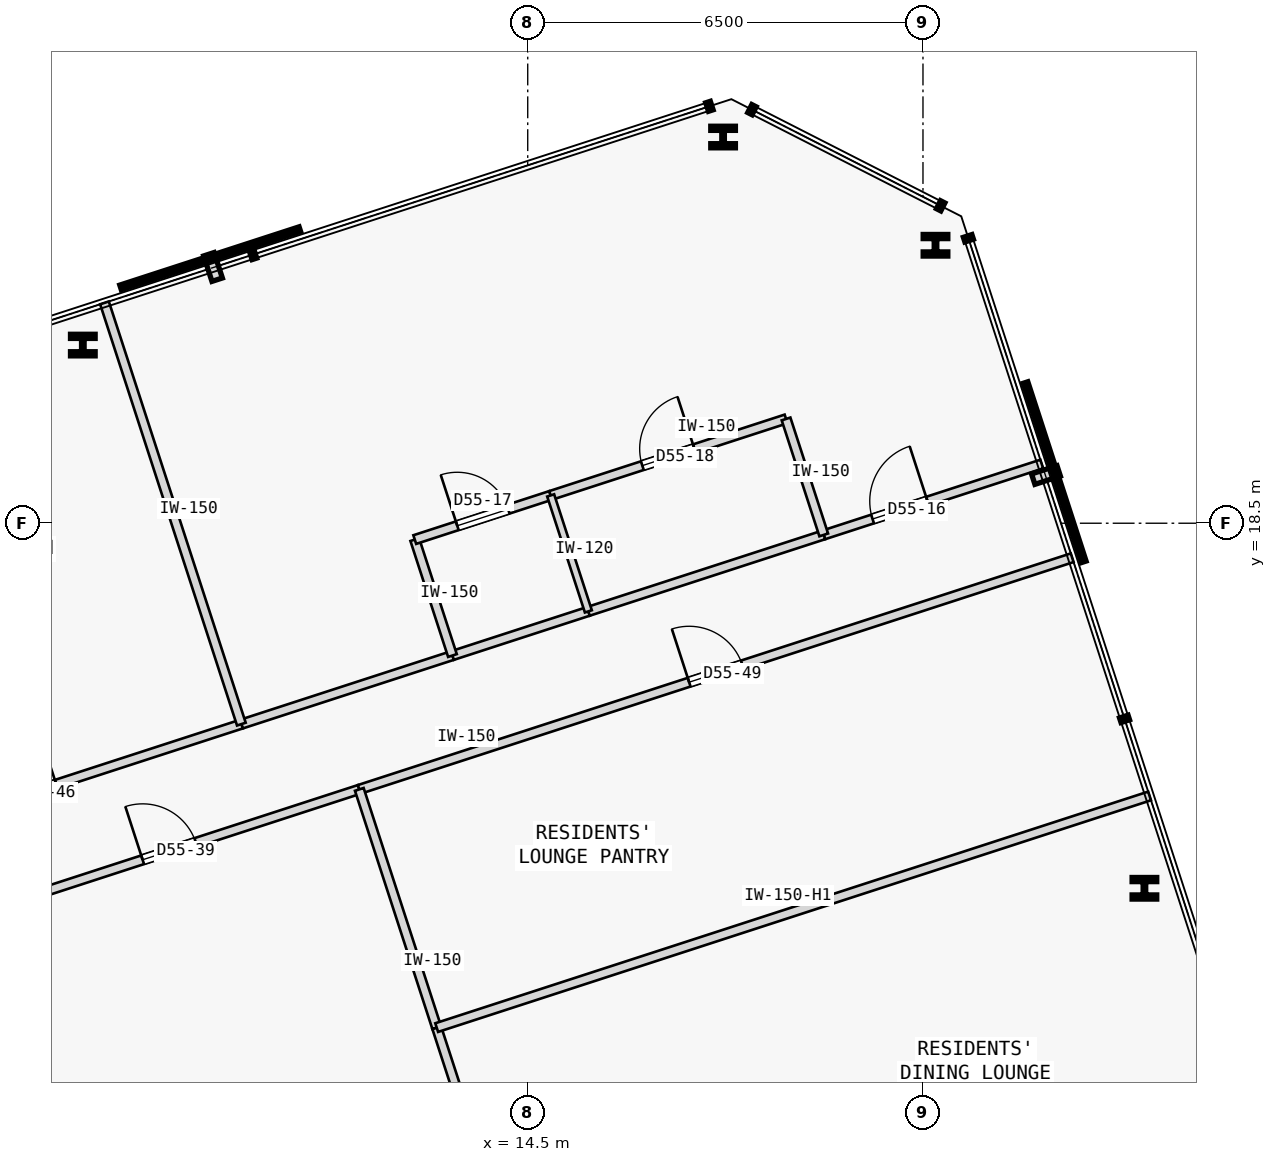
"""IFC4 building model, lengths in metres.
Left out: names, types, materials, properties, quantities, classifications, styles, units other than length and angle.
Written with IfcOpenShell. Run it as: python <this file> out.ifc"""

import sys

from ifc_helpers import new_model, si_unit, direction, frame, frame_2d, origin, origin_2d, place, context, subcontext, project, spatial, rectangle, i_section, extrude, element, fill, save


model = new_model("IFC4")
c1 = context("Model", 3, precision=1e-05, world=origin(), true_north=direction((0.0, 1.0)))
c2 = subcontext(c1, "Body", "Model", "MODEL_VIEW")
j1 = project(units=[si_unit("LENGTHUNIT", "METRE"), si_unit("PLANEANGLEUNIT", "RADIAN")], contexts=[c1])
p1 = place(None, origin())
s1 = spatial("IfcSite", under=j1, at=p1, CompositionType="ELEMENT")
p2 = place(p1, origin())
s2 = spatial("IfcBuilding", under=s1, at=p2, CompositionType="ELEMENT")
p3 = place(p2, frame((0.0, 0.0, 210.9)))
s3 = spatial("IfcBuildingStorey", under=s2, at=p3, CompositionType="ELEMENT", Elevation=210.9)
for number, where, z_axis, x_axis in (
    (1, (24.642, 12.497, 0.0), (0.0, 0.0, 1.0), (1.0, 0.0, 0.0)),
    (2, (21.206, 23.071, 0.0), (0.0, 0.0, 1.0), (1.0, 0.0, 0.0)),
    (3, (17.713, 24.851, 0.0), (0.0, 0.0, 1.0), (1.0, 0.0, 0.0)),
    (4, (7.184, 21.43, 0.0), (0.0, 0.0, 1.0), (1.0, 0.0, 0.0)),
):
    element("IfcColumn", number, at=place(p3, frame(where, z_axis=z_axis, x_axis=x_axis)), inside=s3, PredefinedType="COLUMN", context=c2, shape_type="SweptSolid", body=[
        extrude(i_section(OverallWidth=0.405, OverallDepth=0.355, WebThickness=0.042, FlangeThickness=0.068, FilletRadius=0.015, at=origin_2d()), origin(), (0.0, 0.0, 1.0), 3.35),
    ])
p4 = place(p3, frame((9.791, 15.196, 0.0), z_axis=(0.0, 0.0, 1.0), x_axis=(0.951050780541, 0.309034646652, 0.0)))
e5 = element("IfcWall", 5, at=p4, inside=s3, PredefinedType="PARTITIONING", context=c2, shape_type="SweptSolid", body=[
    extrude(rectangle(XDim=3.65, YDim=0.15, at=frame_2d((1.825, 0.0))), origin(), (0.0, 0.0, 1.0), 3.125),
])
p5 = place(p3, frame((19.368, 18.308, 0.0), z_axis=(0.0, 0.0, 1.0), x_axis=(0.951052151329, 0.309030428036, 0.0)))
e6 = element("IfcWall", 6, at=p5, inside=s3, PredefinedType="PARTITIONING", context=c2, shape_type="SweptSolid", body=[
    extrude(rectangle(XDim=3.77, YDim=0.15, at=frame_2d((1.885, 0.0))), origin(), (0.0, 0.0, 1.0), 3.125),
])
p6 = place(p5, frame((0.844, 0.0, 0.0)))
e7 = element("IfcOpeningElement", 7, at=p6, cuts=e6, PredefinedType="OPENING", context=c2, shape_type="SweptSolid", body=[
    extrude(rectangle(XDim=0.95, YDim=2.15, at=frame_2d((0.475, 1.075))), frame((0.0, 0.085, 0.0), z_axis=(0.0, -1.0, 0.0), x_axis=(1.0, 0.0, 0.0)), (0.0, 0.0, 1.0), 0.17),
])
p7 = place(p3, frame((13.262, 16.324, 0.0), z_axis=(0.0, 0.0, 1.0), x_axis=(0.951045519245, 0.309050837767, 0.0)))
e8 = element("IfcWall", 8, at=p7, inside=s3, PredefinedType="PARTITIONING", context=c2, shape_type="SweptSolid", body=[
    extrude(rectangle(XDim=2.35, YDim=0.15, at=frame_2d((1.175, 0.0))), origin(), (0.0, 0.0, 1.0), 3.125),
])
p8 = place(p3, frame((15.497, 17.051, 0.0), z_axis=(0.0, 0.0, 1.0), x_axis=(0.951067124726, 0.308984343076, 0.0)))
e9 = element("IfcWall", 9, at=p8, inside=s3, PredefinedType="PARTITIONING", context=c2, shape_type="SweptSolid", body=[
    extrude(rectangle(XDim=4.07, YDim=0.15, at=frame_2d((2.035, 0.0))), origin(), (0.0, 0.0, 1.0), 3.125),
])
p9 = place(p3, frame((5.479, 12.092, 0.0), z_axis=(0.0, 0.0, 1.0), x_axis=(0.951051809397, 0.309031480343, 0.0)))
e10 = element("IfcWall", 10, at=p9, inside=s3, PredefinedType="PARTITIONING", context=c2, shape_type="SweptSolid", body=[
    extrude(rectangle(XDim=6.573, YDim=0.15, at=frame_2d((3.287, 0.0))), origin(), (0.0, 0.0, 1.0), 3.125),
])
p10 = place(p9, frame((2.826, 0.0, 0.0)))
e11 = element("IfcOpeningElement", 11, at=p10, cuts=e10, PredefinedType="OPENING", context=c2, shape_type="SweptSolid", body=[
    extrude(rectangle(XDim=0.92, YDim=2.15, at=frame_2d((0.46, 1.075))), frame((0.0, 0.085, 0.0), z_axis=(0.0, -1.0, 0.0), x_axis=(1.0, 0.0, 0.0)), (0.0, 0.0, 1.0), 0.17),
])
p11 = place(p3, frame((2.827, 12.934, 0.0), z_axis=(0.0, 0.0, 1.0), x_axis=(0.951056608557, 0.309016710423, 0.0)))
e12 = element("IfcWall", 12, at=p11, inside=s3, PredefinedType="PARTITIONING", context=c2, shape_type="SweptSolid", body=[
    extrude(rectangle(XDim=7.322, YDim=0.15, at=frame_2d((3.661, 0.0))), origin(), (0.0, 0.0, 1.0), 3.125),
])
p12 = place(p11, frame((3.201, 0.0, 0.0)))
e13 = element("IfcOpeningElement", 13, at=p12, cuts=e12, PredefinedType="OPENING", context=c2, shape_type="SweptSolid", body=[
    extrude(rectangle(XDim=0.92, YDim=2.15, at=frame_2d((0.46, 1.075))), frame((0.0, 0.085, 0.0), z_axis=(0.0, -1.0, 0.0), x_axis=(1.0, 0.0, 0.0)), (0.0, 0.0, 1.0), 0.17),
])
p13 = place(p3, frame((11.73, 14.123, 0.0), z_axis=(0.0, 0.0, 1.0), x_axis=(0.951060263663, 0.309005460926, 0.0)))
e14 = element("IfcWall", 14, at=p13, inside=s3, PredefinedType="PARTITIONING", context=c2, shape_type="SweptSolid", body=[
    extrude(rectangle(XDim=12.327, YDim=0.15, at=frame_2d((6.164, 0.0))), origin(), (0.0, 0.0, 1.0), 3.125),
])
p14 = place(p13, frame((5.704, 0.0, 0.0)))
e15 = element("IfcOpeningElement", 15, at=p14, cuts=e14, PredefinedType="OPENING", context=c2, shape_type="SweptSolid", body=[
    extrude(rectangle(XDim=0.92, YDim=2.15, at=frame_2d((0.46, 1.075))), frame((0.0, 0.085, 0.0), z_axis=(0.0, -1.0, 0.0), x_axis=(1.0, 0.0, 0.0)), (0.0, 0.0, 1.0), 0.17),
])
p15 = place(p3, frame((13.262, 16.324, 0.0), z_axis=(0.0, 0.0, 1.0), x_axis=(-0.309022749039, 0.951054646472, 0.0)))
e16 = element("IfcWall", 16, at=p15, inside=s3, PredefinedType="PARTITIONING", context=c2, shape_type="SweptSolid", body=[
    extrude(rectangle(XDim=2.005, YDim=0.15, at=frame_2d((1.002, 0.0))), origin(), (0.0, 0.0, 1.0), 3.125),
])
p16 = place(p3, frame((12.642, 18.231, 0.0), z_axis=(0.0, 0.0, 1.0), x_axis=(0.951076048914, 0.308956872689, 0.0)))
e17 = element("IfcWall", 17, at=p16, inside=s3, PredefinedType="PARTITIONING", context=c2, shape_type="SweptSolid", body=[
    extrude(rectangle(XDim=2.35, YDim=0.15, at=frame_2d((1.175, 0.0))), origin(), (0.0, 0.0, 1.0), 3.125),
])
p17 = place(p16, frame((0.735, 0.0, 0.0)))
e18 = element("IfcOpeningElement", 18, at=p17, cuts=e17, PredefinedType="OPENING", context=c2, shape_type="SweptSolid", body=[
    extrude(rectangle(XDim=0.88, YDim=2.15, at=frame_2d((0.44, 1.075))), frame((0.0, 0.085, 0.0), z_axis=(0.0, -1.0, 0.0), x_axis=(1.0, 0.0, 0.0)), (0.0, 0.0, 1.0), 0.17),
])
p18 = place(p3, frame((14.877, 18.957, 0.0), z_axis=(0.0, 0.0, 1.0), x_axis=(0.95104949593, 0.309038600002, 0.0)))
e19 = element("IfcWall", 19, at=p18, inside=s3, PredefinedType="PARTITIONING", context=c2, shape_type="SweptSolid", body=[
    extrude(rectangle(XDim=4.07, YDim=0.15, at=frame_2d((2.035, 0.0))), origin(), (0.0, 0.0, 1.0), 3.125),
])
p19 = place(p18, frame((1.585, 0.0, 0.0)))
e20 = element("IfcOpeningElement", 20, at=p19, cuts=e19, PredefinedType="OPENING", context=c2, shape_type="SweptSolid", body=[
    extrude(rectangle(XDim=0.9, YDim=2.15, at=frame_2d((0.45, 1.075))), frame((0.0, 0.085, 0.0), z_axis=(0.0, -1.0, 0.0), x_axis=(1.0, 0.0, 0.0)), (0.0, 0.0, 1.0), 0.17),
])
p20 = place(p3, frame((19.368, 18.308, 0.0), z_axis=(0.0, 0.0, 1.0), x_axis=(-0.309022749039, 0.951054646472, 0.0)))
e21 = element("IfcWall", 21, at=p20, inside=s3, PredefinedType="PARTITIONING", context=c2, shape_type="SweptSolid", body=[
    extrude(rectangle(XDim=2.005, YDim=0.15, at=frame_2d((1.002, 0.0))), origin(), (0.0, 0.0, 1.0), 3.125),
])
p21 = place(p3, frame((9.791, 15.196, 0.0), z_axis=(0.0, 0.0, 1.0), x_axis=(-0.309029230739, 0.951052540372, 0.0)))
e22 = element("IfcWall", 22, at=p21, inside=s3, PredefinedType="PARTITIONING", context=c2, shape_type="SweptSolid", body=[
    extrude(rectangle(XDim=7.284, YDim=0.15, at=frame_2d((3.642, 0.0))), origin(), (0.0, 0.0, 1.0), 3.125),
])
p22 = place(p3, frame((15.497, 17.051, 0.0), z_axis=(0.0, 0.0, 1.0), x_axis=(-0.309058537449, 0.951043017129, 0.0)))
e23 = element("IfcWall", 23, at=p22, inside=s3, PredefinedType="PARTITIONING", context=c2, shape_type="SweptSolid", body=[
    extrude(rectangle(XDim=2.005, YDim=0.12, at=frame_2d((1.002, 0.0))), origin(), (0.0, 0.0, 1.0), 3.125),
])
p23 = place(p3, frame((7.588, 5.6, 0.0), z_axis=(0.0, 0.0, 1.0), x_axis=(-0.309018946982, 0.951055881852, 0.0)))
e24 = element("IfcWall", 24, at=p23, inside=s3, PredefinedType="PARTITIONING", context=c2, shape_type="SweptSolid", body=[
    extrude(rectangle(XDim=6.826, YDim=0.15, at=frame_2d((3.413, 0.0))), origin(), (0.0, 0.0, 1.0), 3.125),
])
p24 = place(p3, frame((14.5, 5.6, 0.0), z_axis=(0.0, 0.0, 1.0), x_axis=(-0.308974360462, 0.951070367837, 0.0)))
e25 = element("IfcWall", 25, at=p24, inside=s3, PredefinedType="PARTITIONING", context=c2, shape_type="SweptSolid", body=[
    extrude(rectangle(XDim=4.843, YDim=0.15, at=frame_2d((2.421, 0.0))), origin(), (0.0, 0.0, 1.0), 3.125),
])
p25 = place(p3, frame((13.003, 10.206, 0.0), z_axis=(0.0, 0.0, 1.0), x_axis=(-0.309035144366, 0.951050618814, 0.0)))
e26 = element("IfcWall", 26, at=p25, inside=s3, PredefinedType="PARTITIONING", context=c2, shape_type="SweptSolid", body=[
    extrude(rectangle(XDim=4.119, YDim=0.15, at=frame_2d((2.06, 0.0))), origin(), (0.0, 0.0, 1.0), 3.125),
])
p26 = place(p3, frame((13.003, 10.206, 0.0), z_axis=(0.0, 0.0, 1.0), x_axis=(0.951060263663, 0.309005460926, 0.0)))
e27 = element("IfcWall", 27, at=p26, inside=s3, PredefinedType="PARTITIONING", context=c2, shape_type="SweptSolid", body=[
    extrude(rectangle(XDim=12.327, YDim=0.15, at=frame_2d((6.164, 0.0))), origin(), (0.0, 0.0, 1.0), 2.675),
])
p27 = place(p6, origin())
e28 = element("IfcDoor", 28, at=p27, inside=s3, OperationType="SINGLE_SWING_RIGHT", PredefinedType="DOOR", context=c2, shape_type="SweptSolid", body=[
    extrude(rectangle(XDim=0.95, YDim=2.15, at=frame_2d((0.475, 1.075))), frame((0.0, 0.025, 0.0), z_axis=(0.0, -1.0, 0.0), x_axis=(1.0, 0.0, 0.0)), (0.0, 0.0, 1.0), 0.05),
])
fill(e7, e28)
p28 = place(p17, origin())
e29 = element("IfcDoor", 29, at=p28, inside=s3, OperationType="SINGLE_SWING_LEFT", PredefinedType="DOOR", context=c2, shape_type="SweptSolid", body=[
    extrude(rectangle(XDim=0.88, YDim=2.15, at=frame_2d((0.44, 1.075))), frame((0.0, 0.025, 0.0), z_axis=(0.0, -1.0, 0.0), x_axis=(1.0, 0.0, 0.0)), (0.0, 0.0, 1.0), 0.05),
])
fill(e18, e29)
p29 = place(p19, origin())
e30 = element("IfcDoor", 30, at=p29, inside=s3, OperationType="SINGLE_SWING_RIGHT", PredefinedType="DOOR", context=c2, shape_type="SweptSolid", body=[
    extrude(rectangle(XDim=0.9, YDim=2.15, at=frame_2d((0.45, 1.075))), frame((0.0, 0.025, 0.0), z_axis=(0.0, -1.0, 0.0), x_axis=(1.0, 0.0, 0.0)), (0.0, 0.0, 1.0), 0.05),
])
fill(e20, e30)
p30 = place(p10, origin())
e31 = element("IfcDoor", 31, at=p30, inside=s3, OperationType="SINGLE_SWING_LEFT", PredefinedType="DOOR", context=c2, shape_type="SweptSolid", body=[
    extrude(rectangle(XDim=0.92, YDim=2.15, at=frame_2d((0.46, 1.075))), frame((0.0, 0.025, 0.0), z_axis=(0.0, -1.0, 0.0), x_axis=(1.0, 0.0, 0.0)), (0.0, 0.0, 1.0), 0.05),
])
fill(e11, e31)
p31 = place(p12, origin())
e32 = element("IfcDoor", 32, at=p31, inside=s3, OperationType="SINGLE_SWING_RIGHT", PredefinedType="DOOR", context=c2, shape_type="SweptSolid", body=[
    extrude(rectangle(XDim=0.92, YDim=2.15, at=frame_2d((0.46, 1.075))), frame((0.0, 0.025, 0.0), z_axis=(0.0, -1.0, 0.0), x_axis=(1.0, 0.0, 0.0)), (0.0, 0.0, 1.0), 0.05),
])
fill(e13, e32)
p32 = place(p14, origin())
e33 = element("IfcDoor", 33, at=p32, inside=s3, OperationType="SINGLE_SWING_LEFT", PredefinedType="DOOR", context=c2, shape_type="SweptSolid", body=[
    extrude(rectangle(XDim=0.92, YDim=2.15, at=frame_2d((0.46, 1.075))), frame((0.0, 0.025, 0.0), z_axis=(0.0, -1.0, 0.0), x_axis=(1.0, 0.0, 0.0)), (0.0, 0.0, 1.0), 0.05),
])
fill(e15, e33)
save(model, sys.argv[1])
